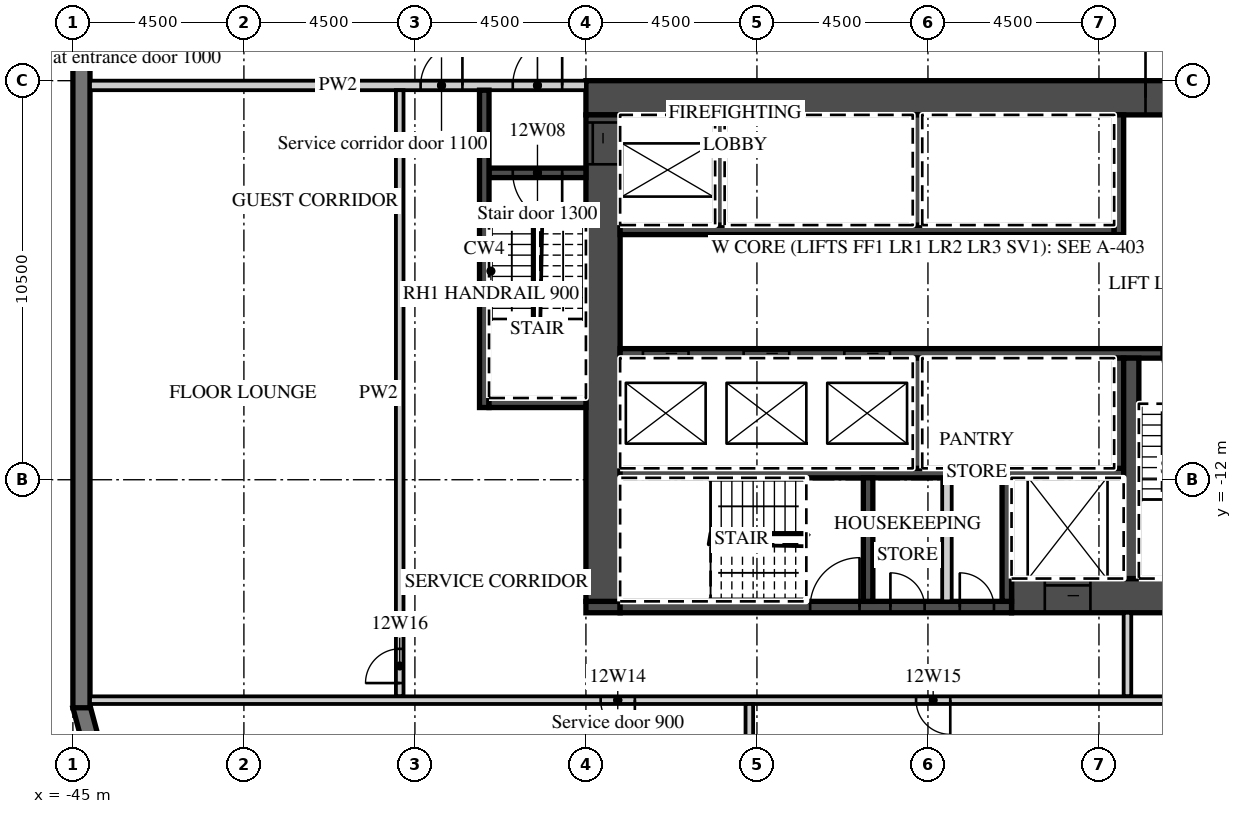
"""IFC4 building model, lengths in metres.
Left out: names, types, materials, properties, quantities, classifications, styles, units other than length and angle.
Written with IfcOpenShell. Run it as: python <this file> out.ifc"""

import sys

from ifc_helpers import new_model, si_unit, direction, frame, frame_2d, origin, place, context, subcontext, project, spatial, polyline, rectangle, outline, extrude, element, fill, save


model = new_model("IFC4")
c1 = context("Model", 3, precision=1e-05, world=origin(), true_north=direction((0.0, 1.0)))
c2 = subcontext(c1, "Body", "Model", "MODEL_VIEW")
j1 = project(units=[si_unit("LENGTHUNIT", "METRE"), si_unit("PLANEANGLEUNIT", "RADIAN")], contexts=[c1])
p1 = place(None, origin())
s1 = spatial("IfcSite", under=j1, at=p1, CompositionType="ELEMENT")
p2 = place(p1, origin())
s2 = spatial("IfcBuilding", under=s1, at=p2, CompositionType="ELEMENT")
p3 = place(p2, frame((0.0, 0.0, 69.9)))
s3 = spatial("IfcBuildingStorey", under=s2, at=p3, CompositionType="ELEMENT", Elevation=69.9)
p4 = place(p3, frame((-44.783, -17.942, 0.0), z_axis=(0.0, 0.0, 1.0), x_axis=(0.25881466832, -0.965926999034, 0.0)))
e1 = element("IfcWall", 1, at=p4, inside=s3, PredefinedType="SOLIDWALL", context=c2, shape_type="SweptSolid", body=[
    extrude(outline(polyline([(0.0, -0.225), (2.071, -0.225), (1.95, 0.225), (0.121, 0.225), (0.0, -0.225)])), origin(), (0.0, 0.0, 1.0), 3.02),
])
p5 = place(p3, frame((-44.775, 18.0, 0.0), z_axis=(0.0, 0.0, 1.0), x_axis=(0.0, -1.0, 0.0)))
e2 = element("IfcWall", 2, at=p5, inside=s3, PredefinedType="SOLIDWALL", context=c2, shape_type="SweptSolid", body=[
    extrude(rectangle(XDim=36.0, YDim=0.45, at=frame_2d((18.0, 0.0))), origin(), (0.0, 0.0, 1.0), 3.02),
])
p6 = place(p5, frame((3.9, 0.0, 0.45)))
e3 = element("IfcOpeningElement", 3, at=p6, cuts=e2, PredefinedType="OPENING", context=c2, shape_type="SweptSolid", body=[
    extrude(rectangle(XDim=3.3, YDim=2.25, at=frame_2d((1.65, 1.125))), frame((0.0, 0.235, 0.0), z_axis=(0.0, -1.0, 0.0), x_axis=(1.0, 0.0, 0.0)), (0.0, 0.0, 1.0), 0.47),
])
p7 = place(p5, frame((8.4, 0.0, 0.45)))
e4 = element("IfcOpeningElement", 4, at=p7, cuts=e2, PredefinedType="OPENING", context=c2, shape_type="SweptSolid", body=[
    extrude(rectangle(XDim=3.3, YDim=2.25, at=frame_2d((1.65, 1.125))), frame((0.0, 0.235, 0.0), z_axis=(0.0, -1.0, 0.0), x_axis=(1.0, 0.0, 0.0)), (0.0, 0.0, 1.0), 0.47),
])
p8 = place(p5, frame((12.9, 0.0, 0.45)))
e5 = element("IfcOpeningElement", 5, at=p8, cuts=e2, PredefinedType="OPENING", context=c2, shape_type="SweptSolid", body=[
    extrude(rectangle(XDim=3.3, YDim=2.25, at=frame_2d((1.65, 1.125))), frame((0.0, 0.235, 0.0), z_axis=(0.0, -1.0, 0.0), x_axis=(1.0, 0.0, 0.0)), (0.0, 0.0, 1.0), 0.47),
])
p9 = place(p3, frame((-31.5, -1.95, 0.0), z_axis=(0.0, 0.0, 1.0), x_axis=(1.0, 0.0, 0.0)))
e6 = element("IfcWall", 6, at=p9, inside=s3, PredefinedType="SHEAR", context=c2, shape_type="SweptSolid", body=[
    extrude(rectangle(XDim=18.0, YDim=0.9, at=frame_2d((9.0, 0.0))), origin(), (0.0, 0.0, 1.0), 3.02),
])
p10 = place(p9, frame((14.725, 0.0, 0.0)))
e7 = element("IfcOpeningElement", 7, at=p10, cuts=e6, PredefinedType="OPENING", context=c2, shape_type="SweptSolid", body=[
    extrude(rectangle(XDim=1.8, YDim=2.1, at=frame_2d((0.9, 1.05))), frame((0.0, 0.46, 0.0), z_axis=(0.0, -1.0, 0.0), x_axis=(1.0, 0.0, 0.0)), (0.0, 0.0, 1.0), 0.92),
])
p11 = place(p3, frame((-20.3, -15.05, 0.0), z_axis=(0.0, 0.0, 1.0), x_axis=(1.0, 0.0, 0.0)))
e8 = element("IfcWall", 8, at=p11, inside=s3, PredefinedType="SHEAR", context=c2, shape_type="SweptSolid", body=[
    extrude(rectangle(XDim=6.8, YDim=0.9, at=frame_2d((3.4, 0.0))), origin(), (0.0, 0.0, 1.0), 3.02),
])
p12 = place(p11, frame((0.875, 0.0, 0.0)))
e9 = element("IfcOpeningElement", 9, at=p12, cuts=e8, PredefinedType="OPENING", context=c2, shape_type="SweptSolid", body=[
    extrude(rectangle(XDim=1.2, YDim=2.1, at=frame_2d((0.6, 1.05))), frame((0.0, 0.46, 0.0), z_axis=(0.0, -1.0, 0.0), x_axis=(1.0, 0.0, 0.0)), (0.0, 0.0, 1.0), 0.92),
])
p13 = place(p3, frame((-31.5, -15.35, 0.0), z_axis=(0.0, 0.0, 1.0), x_axis=(1.0, 0.0, 0.0)))
e10 = element("IfcWall", 10, at=p13, inside=s3, PredefinedType="SHEAR", context=c2, shape_type="SweptSolid", body=[
    extrude(rectangle(XDim=0.9, YDim=0.3, at=frame_2d((0.45, 0.0))), origin(), (0.0, 0.0, 1.0), 3.02),
])
p14 = place(p3, frame((-30.6, -15.35, 0.0), z_axis=(0.0, 0.0, 1.0), x_axis=(1.0, 0.0, 0.0)))
e11 = element("IfcWall", 11, at=p14, inside=s3, PredefinedType="SHEAR", context=c2, shape_type="SweptSolid", body=[
    extrude(rectangle(XDim=10.3, YDim=0.3, at=frame_2d((5.15, 0.0))), origin(), (0.0, 0.0, 1.0), 3.02),
])
p15 = place(p14, frame((5.0, 0.0, 0.0)))
e12 = element("IfcOpeningElement", 12, at=p15, cuts=e11, PredefinedType="OPENING", context=c2, shape_type="SweptSolid", body=[
    extrude(rectangle(XDim=1.3, YDim=2.1, at=frame_2d((0.65, 1.05))), frame((0.0, 0.16, 0.0), z_axis=(0.0, -1.0, 0.0), x_axis=(1.0, 0.0, 0.0)), (0.0, 0.0, 1.0), 0.32),
])
p16 = place(p14, frame((7.113, 0.0, 0.0)))
e13 = element("IfcOpeningElement", 13, at=p16, cuts=e11, PredefinedType="OPENING", context=c2, shape_type="SweptSolid", body=[
    extrude(rectangle(XDim=0.9, YDim=2.1, at=frame_2d((0.45, 1.05))), frame((0.0, 0.16, 0.0), z_axis=(0.0, -1.0, 0.0), x_axis=(1.0, 0.0, 0.0)), (0.0, 0.0, 1.0), 0.32),
])
p17 = place(p14, frame((8.938, 0.0, 0.0)))
e14 = element("IfcOpeningElement", 14, at=p17, cuts=e11, PredefinedType="OPENING", context=c2, shape_type="SweptSolid", body=[
    extrude(rectangle(XDim=0.9, YDim=2.1, at=frame_2d((0.45, 1.05))), frame((0.0, 0.16, 0.0), z_axis=(0.0, -1.0, 0.0), x_axis=(1.0, 0.0, 0.0)), (0.0, 0.0, 1.0), 0.32),
])
p18 = place(p3, frame((-31.05, -15.2, 0.0), z_axis=(0.0, 0.0, 1.0), x_axis=(0.0, 1.0, 0.0)))
e15 = element("IfcWall", 15, at=p18, inside=s3, PredefinedType="SHEAR", context=c2, shape_type="SweptSolid", body=[
    extrude(rectangle(XDim=12.8, YDim=0.9, at=frame_2d((6.4, 0.0))), origin(), (0.0, 0.0, 1.0), 3.02),
])
p19 = place(p18, frame((11.5, 0.0, 0.0)))
e16 = element("IfcOpeningElement", 16, at=p19, cuts=e15, PredefinedType="OPENING", context=c2, shape_type="SweptSolid", body=[
    extrude(rectangle(XDim=1.1, YDim=2.1, at=frame_2d((0.55, 1.05))), frame((0.0, 0.46, 0.0), z_axis=(0.0, -1.0, 0.0), x_axis=(1.0, 0.0, 0.0)), (0.0, 0.0, 1.0), 0.92),
])
p20 = place(p3, frame((-30.6, -5.425, 0.0), z_axis=(0.0, 0.0, 1.0), x_axis=(1.0, 0.0, 0.0)))
e17 = element("IfcWall", 17, at=p20, inside=s3, PredefinedType="SHEAR", context=c2, shape_type="SweptSolid", body=[
    extrude(rectangle(XDim=13.0, YDim=0.25, at=frame_2d((6.5, 0.0))), origin(), (0.0, 0.0, 1.0), 3.02),
])
p21 = place(p3, frame((-17.475, -5.55, 0.0), z_axis=(0.0, 0.0, 1.0), x_axis=(0.0, 1.0, 0.0)))
e18 = element("IfcWall", 18, at=p21, inside=s3, PredefinedType="SHEAR", context=c2, shape_type="SweptSolid", body=[
    extrude(rectangle(XDim=3.15, YDim=0.25, at=frame_2d((1.575, 0.0))), origin(), (0.0, 0.0, 1.0), 3.02),
])
for number, where, z_axis, x_axis in (
    (19, (-27.975, -5.3, 0.0), (0.0, 0.0, 1.0), (0.0, 1.0, 0.0)),
    (20, (-22.775, -5.3, 0.0), (0.0, 0.0, 1.0), (0.0, 1.0, 0.0)),
):
    element("IfcWall", number, at=place(p3, frame(where, z_axis=z_axis, x_axis=x_axis)), inside=s3, PredefinedType="SHEAR", context=c2, shape_type="SweptSolid", body=[
        extrude(rectangle(XDim=2.9, YDim=0.25, at=frame_2d((1.45, 0.0))), origin(), (0.0, 0.0, 1.0), 3.02),
    ])
p22 = place(p3, frame((-30.6, -8.675, 0.0), z_axis=(0.0, 0.0, 1.0), x_axis=(1.0, 0.0, 0.0)))
e21 = element("IfcWall", 21, at=p22, inside=s3, PredefinedType="SHEAR", context=c2, shape_type="SweptSolid", body=[
    extrude(rectangle(XDim=16.2, YDim=0.25, at=frame_2d((8.1, 0.0))), origin(), (0.0, 0.0, 1.0), 3.02),
])
p23 = place(p22, frame((0.6, 0.0, 0.0)))
e22 = element("IfcOpeningElement", 22, at=p23, cuts=e21, PredefinedType="OPENING", context=c2, shape_type="SweptSolid", body=[
    extrude(rectangle(XDim=1.2, YDim=2.1, at=frame_2d((0.6, 1.05))), frame((0.0, 0.135, 0.0), z_axis=(0.0, -1.0, 0.0), x_axis=(1.0, 0.0, 0.0)), (0.0, 0.0, 1.0), 0.27),
])
p24 = place(p22, frame((3.25, 0.0, 0.0)))
e23 = element("IfcOpeningElement", 23, at=p24, cuts=e21, PredefinedType="OPENING", context=c2, shape_type="SweptSolid", body=[
    extrude(rectangle(XDim=1.2, YDim=2.1, at=frame_2d((0.6, 1.05))), frame((0.0, 0.135, 0.0), z_axis=(0.0, -1.0, 0.0), x_axis=(1.0, 0.0, 0.0)), (0.0, 0.0, 1.0), 0.27),
])
p25 = place(p22, frame((5.9, 0.0, 0.0)))
e24 = element("IfcOpeningElement", 24, at=p25, cuts=e21, PredefinedType="OPENING", context=c2, shape_type="SweptSolid", body=[
    extrude(rectangle(XDim=1.2, YDim=2.1, at=frame_2d((0.6, 1.05))), frame((0.0, 0.135, 0.0), z_axis=(0.0, -1.0, 0.0), x_axis=(1.0, 0.0, 0.0)), (0.0, 0.0, 1.0), 0.27),
])
p26 = place(p22, frame((14.25, 0.0, 0.0)))
e25 = element("IfcOpeningElement", 25, at=p26, cuts=e21, PredefinedType="OPENING", context=c2, shape_type="SweptSolid", body=[
    extrude(rectangle(XDim=1.3, YDim=2.1, at=frame_2d((0.65, 1.05))), frame((0.0, 0.135, 0.0), z_axis=(0.0, -1.0, 0.0), x_axis=(1.0, 0.0, 0.0)), (0.0, 0.0, 1.0), 0.27),
])
p27 = place(p3, frame((-30.6, -11.825, 0.0), z_axis=(0.0, 0.0, 1.0), x_axis=(1.0, 0.0, 0.0)))
e26 = element("IfcWall", 26, at=p27, inside=s3, PredefinedType="SHEAR", context=c2, shape_type="SweptSolid", body=[
    extrude(rectangle(XDim=13.25, YDim=0.25, at=frame_2d((6.625, 0.0))), origin(), (0.0, 0.0, 1.0), 3.02),
])
for number, where, z_axis, x_axis in (
    (27, (-17.475, -11.7, 0.0), (0.0, 0.0, 1.0), (0.0, 1.0, 0.0)),
    (28, (-22.775, -11.7, 0.0), (0.0, 0.0, 1.0), (0.0, 1.0, 0.0)),
):
    element("IfcWall", number, at=place(p3, frame(where, z_axis=z_axis, x_axis=x_axis)), inside=s3, PredefinedType="SHEAR", context=c2, shape_type="SweptSolid", body=[
        extrude(rectangle(XDim=2.9, YDim=0.25, at=frame_2d((1.45, 0.0))), origin(), (0.0, 0.0, 1.0), 3.02),
    ])
p28 = place(p3, frame((-17.15, -14.6, 0.0), z_axis=(0.0, 0.0, 1.0), x_axis=(0.0, 1.0, 0.0)))
e29 = element("IfcWall", 29, at=p28, inside=s3, PredefinedType="SHEAR", context=c2, shape_type="SweptSolid", body=[
    extrude(rectangle(XDim=5.8, YDim=0.4, at=frame_2d((2.9, 0.0))), origin(), (0.0, 0.0, 1.0), 3.02),
])
for number, where, z_axis, x_axis in (
    (30, (-20.425, -15.2, 0.0), (0.0, 0.0, 1.0), (0.0, 1.0, 0.0)),
    (31, (-24.075, -15.2, 0.0), (0.0, 0.0, 1.0), (0.0, 1.0, 0.0)),
):
    element("IfcWall", number, at=place(p3, frame(where, z_axis=z_axis, x_axis=x_axis)), inside=s3, PredefinedType="SHEAR", context=c2, shape_type="SweptSolid", body=[
        extrude(rectangle(XDim=3.25, YDim=0.25, at=frame_2d((1.625, 0.0))), origin(), (0.0, 0.0, 1.0), 3.02),
    ])
p29 = place(p3, frame((-22.0, -15.2, 0.0), z_axis=(0.0, 0.0, 1.0), x_axis=(0.0, 1.0, 0.0)))
e32 = element("IfcWall", 32, at=p29, inside=s3, PredefinedType="PARTITIONING", context=c2, shape_type="SweptSolid", body=[
    extrude(rectangle(XDim=3.25, YDim=0.25, at=frame_2d((1.625, 0.0))), origin(), (0.0, 0.0, 1.0), 3.02),
])
p30 = place(p3, frame((-44.55, -1.625, 0.0), z_axis=(0.0, 0.0, 1.0), x_axis=(1.0, 0.0, 0.0)))
e33 = element("IfcWall", 33, at=p30, inside=s3, PredefinedType="PARTITIONING", context=c2, shape_type="SweptSolid", body=[
    extrude(rectangle(XDim=13.05, YDim=0.25, at=frame_2d((6.525, 0.0))), origin(), (0.0, 0.0, 1.0), 3.02),
])
p31 = place(p30, frame((11.125, 0.0, 0.0)))
e34 = element("IfcOpeningElement", 34, at=p31, cuts=e33, PredefinedType="OPENING", context=c2, shape_type="SweptSolid", body=[
    extrude(rectangle(XDim=1.3, YDim=2.1, at=frame_2d((0.65, 1.05))), frame((0.0, 0.135, 0.0), z_axis=(0.0, -1.0, 0.0), x_axis=(1.0, 0.0, 0.0)), (0.0, 0.0, 1.0), 0.27),
])
p32 = place(p30, frame((8.7, 0.0, 0.0)))
e35 = element("IfcOpeningElement", 35, at=p32, cuts=e33, PredefinedType="OPENING", context=c2, shape_type="SweptSolid", body=[
    extrude(rectangle(XDim=1.1, YDim=2.1, at=frame_2d((0.55, 1.05))), frame((0.0, 0.135, 0.0), z_axis=(0.0, -1.0, 0.0), x_axis=(1.0, 0.0, 0.0)), (0.0, 0.0, 1.0), 0.27),
])
p33 = place(p3, frame((-34.05, -3.925, 0.0), z_axis=(0.0, 0.0, 1.0), x_axis=(1.0, 0.0, 0.0)))
e36 = element("IfcWall", 36, at=p33, inside=s3, PredefinedType="SHEAR", context=c2, shape_type="SweptSolid", body=[
    extrude(rectangle(XDim=2.55, YDim=0.25, at=frame_2d((1.275, 0.0))), origin(), (0.0, 0.0, 1.0), 3.02),
])
p34 = place(p33, frame((0.625, 0.0, 0.0)))
e37 = element("IfcOpeningElement", 37, at=p34, cuts=e36, PredefinedType="OPENING", context=c2, shape_type="SweptSolid", body=[
    extrude(rectangle(XDim=1.3, YDim=2.1, at=frame_2d((0.65, 1.05))), frame((0.0, 0.135, 0.0), z_axis=(0.0, -1.0, 0.0), x_axis=(1.0, 0.0, 0.0)), (0.0, 0.0, 1.0), 0.27),
])
p35 = place(p3, frame((-34.175, -10.1, 0.0), z_axis=(0.0, 0.0, 1.0), x_axis=(0.0, 1.0, 0.0)))
e38 = element("IfcWall", 38, at=p35, inside=s3, PredefinedType="SHEAR", context=c2, shape_type="SweptSolid", body=[
    extrude(rectangle(XDim=8.35, YDim=0.25, at=frame_2d((4.175, 0.0))), origin(), (0.0, 0.0, 1.0), 3.02),
])
p36 = place(p3, frame((-34.05, -9.975, 0.0), z_axis=(0.0, 0.0, 1.0), x_axis=(1.0, 0.0, 0.0)))
e39 = element("IfcWall", 39, at=p36, inside=s3, PredefinedType="SHEAR", context=c2, shape_type="SweptSolid", body=[
    extrude(rectangle(XDim=2.55, YDim=0.25, at=frame_2d((1.275, 0.0))), origin(), (0.0, 0.0, 1.0), 3.02),
])
p37 = place(p3, frame((-17.25, -17.7, 0.0), z_axis=(0.0, 0.0, 1.0), x_axis=(0.0, 1.0, 0.0)))
e40 = element("IfcWall", 40, at=p37, inside=s3, PredefinedType="PARTITIONING", context=c2, shape_type="SweptSolid", body=[
    extrude(rectangle(XDim=2.2, YDim=0.2, at=frame_2d((1.1, 0.0))), origin(), (0.0, 0.0, 1.0), 3.02),
])
p38 = place(p3, frame((-36.4, -17.7, 0.0), z_axis=(0.0, 0.0, 1.0), x_axis=(0.0, 1.0, 0.0)))
e41 = element("IfcWall", 41, at=p38, inside=s3, PredefinedType="PARTITIONING", context=c2, shape_type="SweptSolid", body=[
    extrude(rectangle(XDim=15.95, YDim=0.2, at=frame_2d((7.975, 0.0))), origin(), (0.0, 0.0, 1.0), 3.02),
])
p39 = place(p38, frame((0.35, 0.0, 0.0)))
e42 = element("IfcOpeningElement", 42, at=p39, cuts=e41, PredefinedType="OPENING", context=c2, shape_type="SweptSolid", body=[
    extrude(rectangle(XDim=0.9, YDim=2.1, at=frame_2d((0.45, 1.05))), frame((0.0, 0.11, 0.0), z_axis=(0.0, -1.0, 0.0), x_axis=(1.0, 0.0, 0.0)), (0.0, 0.0, 1.0), 0.22),
])
p40 = place(p3, frame((-44.55, -17.8, 0.0), z_axis=(0.0, 0.0, 1.0), x_axis=(1.0, 0.0, 0.0)))
e43 = element("IfcWall", 43, at=p40, inside=s3, PredefinedType="PARTITIONING", context=c2, shape_type="SweptSolid", body=[
    extrude(rectangle(XDim=30.95, YDim=0.2, at=frame_2d((15.475, 0.0))), origin(), (0.0, 0.0, 1.0), 3.02),
])
p41 = place(p40, frame((13.438, 0.0, 0.0)))
e44 = element("IfcOpeningElement", 44, at=p41, cuts=e43, PredefinedType="OPENING", context=c2, shape_type="SweptSolid", body=[
    extrude(rectangle(XDim=0.9, YDim=2.1, at=frame_2d((0.45, 1.05))), frame((0.0, 0.11, 0.0), z_axis=(0.0, -1.0, 0.0), x_axis=(1.0, 0.0, 0.0)), (0.0, 0.0, 1.0), 0.22),
])
p42 = place(p40, frame((21.738, 0.0, 0.0)))
e45 = element("IfcOpeningElement", 45, at=p42, cuts=e43, PredefinedType="OPENING", context=c2, shape_type="SweptSolid", body=[
    extrude(rectangle(XDim=0.9, YDim=2.1, at=frame_2d((0.45, 1.05))), frame((0.0, 0.11, 0.0), z_axis=(0.0, -1.0, 0.0), x_axis=(1.0, 0.0, 0.0)), (0.0, 0.0, 1.0), 0.22),
])
p43 = place(p3, frame((-27.2, -21.55, 0.0), z_axis=(0.0, 0.0, 1.0), x_axis=(0.0, 1.0, 0.0)))
e46 = element("IfcWall", 46, at=p43, inside=s3, PredefinedType="PARTITIONING", context=c2, shape_type="SweptSolid", body=[
    extrude(rectangle(XDim=3.65, YDim=0.2, at=frame_2d((1.825, 0.0))), origin(), (0.0, 0.0, 1.0), 3.02),
])
p44 = place(p23, origin())
e47 = element("IfcDoor", 47, at=p44, inside=s3, OperationType="SLIDING_TO_LEFT", PredefinedType="DOOR", context=c2, shape_type="SweptSolid", body=[
    extrude(rectangle(XDim=1.2, YDim=2.1, at=frame_2d((0.6, 1.05))), frame((0.0, 0.025, 0.0), z_axis=(0.0, -1.0, 0.0), x_axis=(1.0, 0.0, 0.0)), (0.0, 0.0, 1.0), 0.05),
])
fill(e22, e47)
p45 = place(p24, origin())
e48 = element("IfcDoor", 48, at=p45, inside=s3, OperationType="SLIDING_TO_RIGHT", PredefinedType="DOOR", context=c2, shape_type="SweptSolid", body=[
    extrude(rectangle(XDim=1.2, YDim=2.1, at=frame_2d((0.6, 1.05))), frame((0.0, 0.025, 0.0), z_axis=(0.0, -1.0, 0.0), x_axis=(1.0, 0.0, 0.0)), (0.0, 0.0, 1.0), 0.05),
])
fill(e23, e48)
p46 = place(p25, origin())
e49 = element("IfcDoor", 49, at=p46, inside=s3, OperationType="SLIDING_TO_RIGHT", PredefinedType="DOOR", context=c2, shape_type="SweptSolid", body=[
    extrude(rectangle(XDim=1.2, YDim=2.1, at=frame_2d((0.6, 1.05))), frame((0.0, 0.025, 0.0), z_axis=(0.0, -1.0, 0.0), x_axis=(1.0, 0.0, 0.0)), (0.0, 0.0, 1.0), 0.05),
])
fill(e24, e49)
p47 = place(p12, origin())
e50 = element("IfcDoor", 50, at=p47, inside=s3, OperationType="SLIDING_TO_LEFT", PredefinedType="DOOR", context=c2, shape_type="SweptSolid", body=[
    extrude(rectangle(XDim=1.2, YDim=2.1, at=frame_2d((0.6, 1.05))), frame((0.0, 0.025, 0.0), z_axis=(0.0, -1.0, 0.0), x_axis=(1.0, 0.0, 0.0)), (0.0, 0.0, 1.0), 0.05),
])
fill(e9, e50)
p48 = place(p19, origin())
e51 = element("IfcDoor", 51, at=p48, inside=s3, OperationType="SLIDING_TO_RIGHT", PredefinedType="DOOR", context=c2, shape_type="SweptSolid", body=[
    extrude(rectangle(XDim=1.1, YDim=2.1, at=frame_2d((0.55, 1.05))), frame((0.0, 0.025, 0.0), z_axis=(0.0, -1.0, 0.0), x_axis=(1.0, 0.0, 0.0)), (0.0, 0.0, 1.0), 0.05),
])
fill(e16, e51)
p49 = place(p10, origin())
e52 = element("IfcDoor", 52, at=p49, inside=s3, OperationType="DOUBLE_DOOR_DOUBLE_SWING", PredefinedType="DOOR", context=c2, shape_type="SweptSolid", body=[
    extrude(rectangle(XDim=1.8, YDim=2.1, at=frame_2d((0.9, 1.05))), frame((0.0, 0.025, 0.0), z_axis=(0.0, -1.0, 0.0), x_axis=(1.0, 0.0, 0.0)), (0.0, 0.0, 1.0), 0.05),
])
fill(e7, e52)
p50 = place(p31, origin())
e53 = element("IfcDoor", 53, at=p50, inside=s3, OperationType="SINGLE_SWING_RIGHT", PredefinedType="DOOR", context=c2, shape_type="SweptSolid", body=[
    extrude(rectangle(XDim=1.3, YDim=2.1, at=frame_2d((0.65, 1.05))), frame((0.0, 0.025, 0.0), z_axis=(0.0, -1.0, 0.0), x_axis=(1.0, 0.0, 0.0)), (0.0, 0.0, 1.0), 0.05),
])
fill(e34, e53)
p51 = place(p34, origin())
e54 = element("IfcDoor", 54, at=p51, inside=s3, OperationType="SINGLE_SWING_RIGHT", PredefinedType="DOOR", context=c2, shape_type="SweptSolid", body=[
    extrude(rectangle(XDim=1.3, YDim=2.1, at=frame_2d((0.65, 1.05))), frame((0.0, 0.025, 0.0), z_axis=(0.0, -1.0, 0.0), x_axis=(1.0, 0.0, 0.0)), (0.0, 0.0, 1.0), 0.05),
])
fill(e37, e54)
p52 = place(p32, origin())
e55 = element("IfcDoor", 55, at=p52, inside=s3, OperationType="SINGLE_SWING_RIGHT", PredefinedType="DOOR", context=c2, shape_type="SweptSolid", body=[
    extrude(rectangle(XDim=1.1, YDim=2.1, at=frame_2d((0.55, 1.05))), frame((0.0, 0.025, 0.0), z_axis=(0.0, -1.0, 0.0), x_axis=(1.0, 0.0, 0.0)), (0.0, 0.0, 1.0), 0.05),
])
fill(e35, e55)
p53 = place(p26, origin())
e56 = element("IfcDoor", 56, at=p53, inside=s3, OperationType="SINGLE_SWING_RIGHT", PredefinedType="DOOR", context=c2, shape_type="SweptSolid", body=[
    extrude(rectangle(XDim=1.3, YDim=2.1, at=frame_2d((0.65, 1.05))), frame((0.0, 0.025, 0.0), z_axis=(0.0, -1.0, 0.0), x_axis=(1.0, 0.0, 0.0)), (0.0, 0.0, 1.0), 0.05),
])
fill(e25, e56)
p54 = place(p15, origin())
e57 = element("IfcDoor", 57, at=p54, inside=s3, OperationType="SINGLE_SWING_RIGHT", PredefinedType="DOOR", context=c2, shape_type="SweptSolid", body=[
    extrude(rectangle(XDim=1.3, YDim=2.1, at=frame_2d((0.65, 1.05))), frame((0.0, 0.025, 0.0), z_axis=(0.0, -1.0, 0.0), x_axis=(1.0, 0.0, 0.0)), (0.0, 0.0, 1.0), 0.05),
])
fill(e12, e57)
p55 = place(p16, origin())
e58 = element("IfcDoor", 58, at=p55, inside=s3, OperationType="SINGLE_SWING_LEFT", PredefinedType="DOOR", context=c2, shape_type="SweptSolid", body=[
    extrude(rectangle(XDim=0.9, YDim=2.1, at=frame_2d((0.45, 1.05))), frame((0.0, 0.025, 0.0), z_axis=(0.0, -1.0, 0.0), x_axis=(1.0, 0.0, 0.0)), (0.0, 0.0, 1.0), 0.05),
])
fill(e13, e58)
p56 = place(p17, origin())
e59 = element("IfcDoor", 59, at=p56, inside=s3, OperationType="SINGLE_SWING_LEFT", PredefinedType="DOOR", context=c2, shape_type="SweptSolid", body=[
    extrude(rectangle(XDim=0.9, YDim=2.1, at=frame_2d((0.45, 1.05))), frame((0.0, 0.025, 0.0), z_axis=(0.0, -1.0, 0.0), x_axis=(1.0, 0.0, 0.0)), (0.0, 0.0, 1.0), 0.05),
])
fill(e14, e59)
p57 = place(p41, origin())
e60 = element("IfcDoor", 60, at=p57, inside=s3, OperationType="SINGLE_SWING_RIGHT", PredefinedType="DOOR", context=c2, shape_type="SweptSolid", body=[
    extrude(rectangle(XDim=0.9, YDim=2.1, at=frame_2d((0.45, 1.05))), frame((0.0, 0.025, 0.0), z_axis=(0.0, -1.0, 0.0), x_axis=(1.0, 0.0, 0.0)), (0.0, 0.0, 1.0), 0.05),
])
fill(e44, e60)
p58 = place(p42, origin())
e61 = element("IfcDoor", 61, at=p58, inside=s3, OperationType="SINGLE_SWING_RIGHT", PredefinedType="DOOR", context=c2, shape_type="SweptSolid", body=[
    extrude(rectangle(XDim=0.9, YDim=2.1, at=frame_2d((0.45, 1.05))), frame((0.0, 0.025, 0.0), z_axis=(0.0, -1.0, 0.0), x_axis=(1.0, 0.0, 0.0)), (0.0, 0.0, 1.0), 0.05),
])
fill(e45, e61)
p59 = place(p39, origin())
e62 = element("IfcDoor", 62, at=p59, inside=s3, OperationType="SINGLE_SWING_LEFT", PredefinedType="DOOR", context=c2, shape_type="SweptSolid", body=[
    extrude(rectangle(XDim=0.9, YDim=2.1, at=frame_2d((0.45, 1.05))), frame((0.0, 0.025, 0.0), z_axis=(0.0, -1.0, 0.0), x_axis=(1.0, 0.0, 0.0)), (0.0, 0.0, 1.0), 0.05),
])
fill(e42, e62)
save(model, sys.argv[1])
